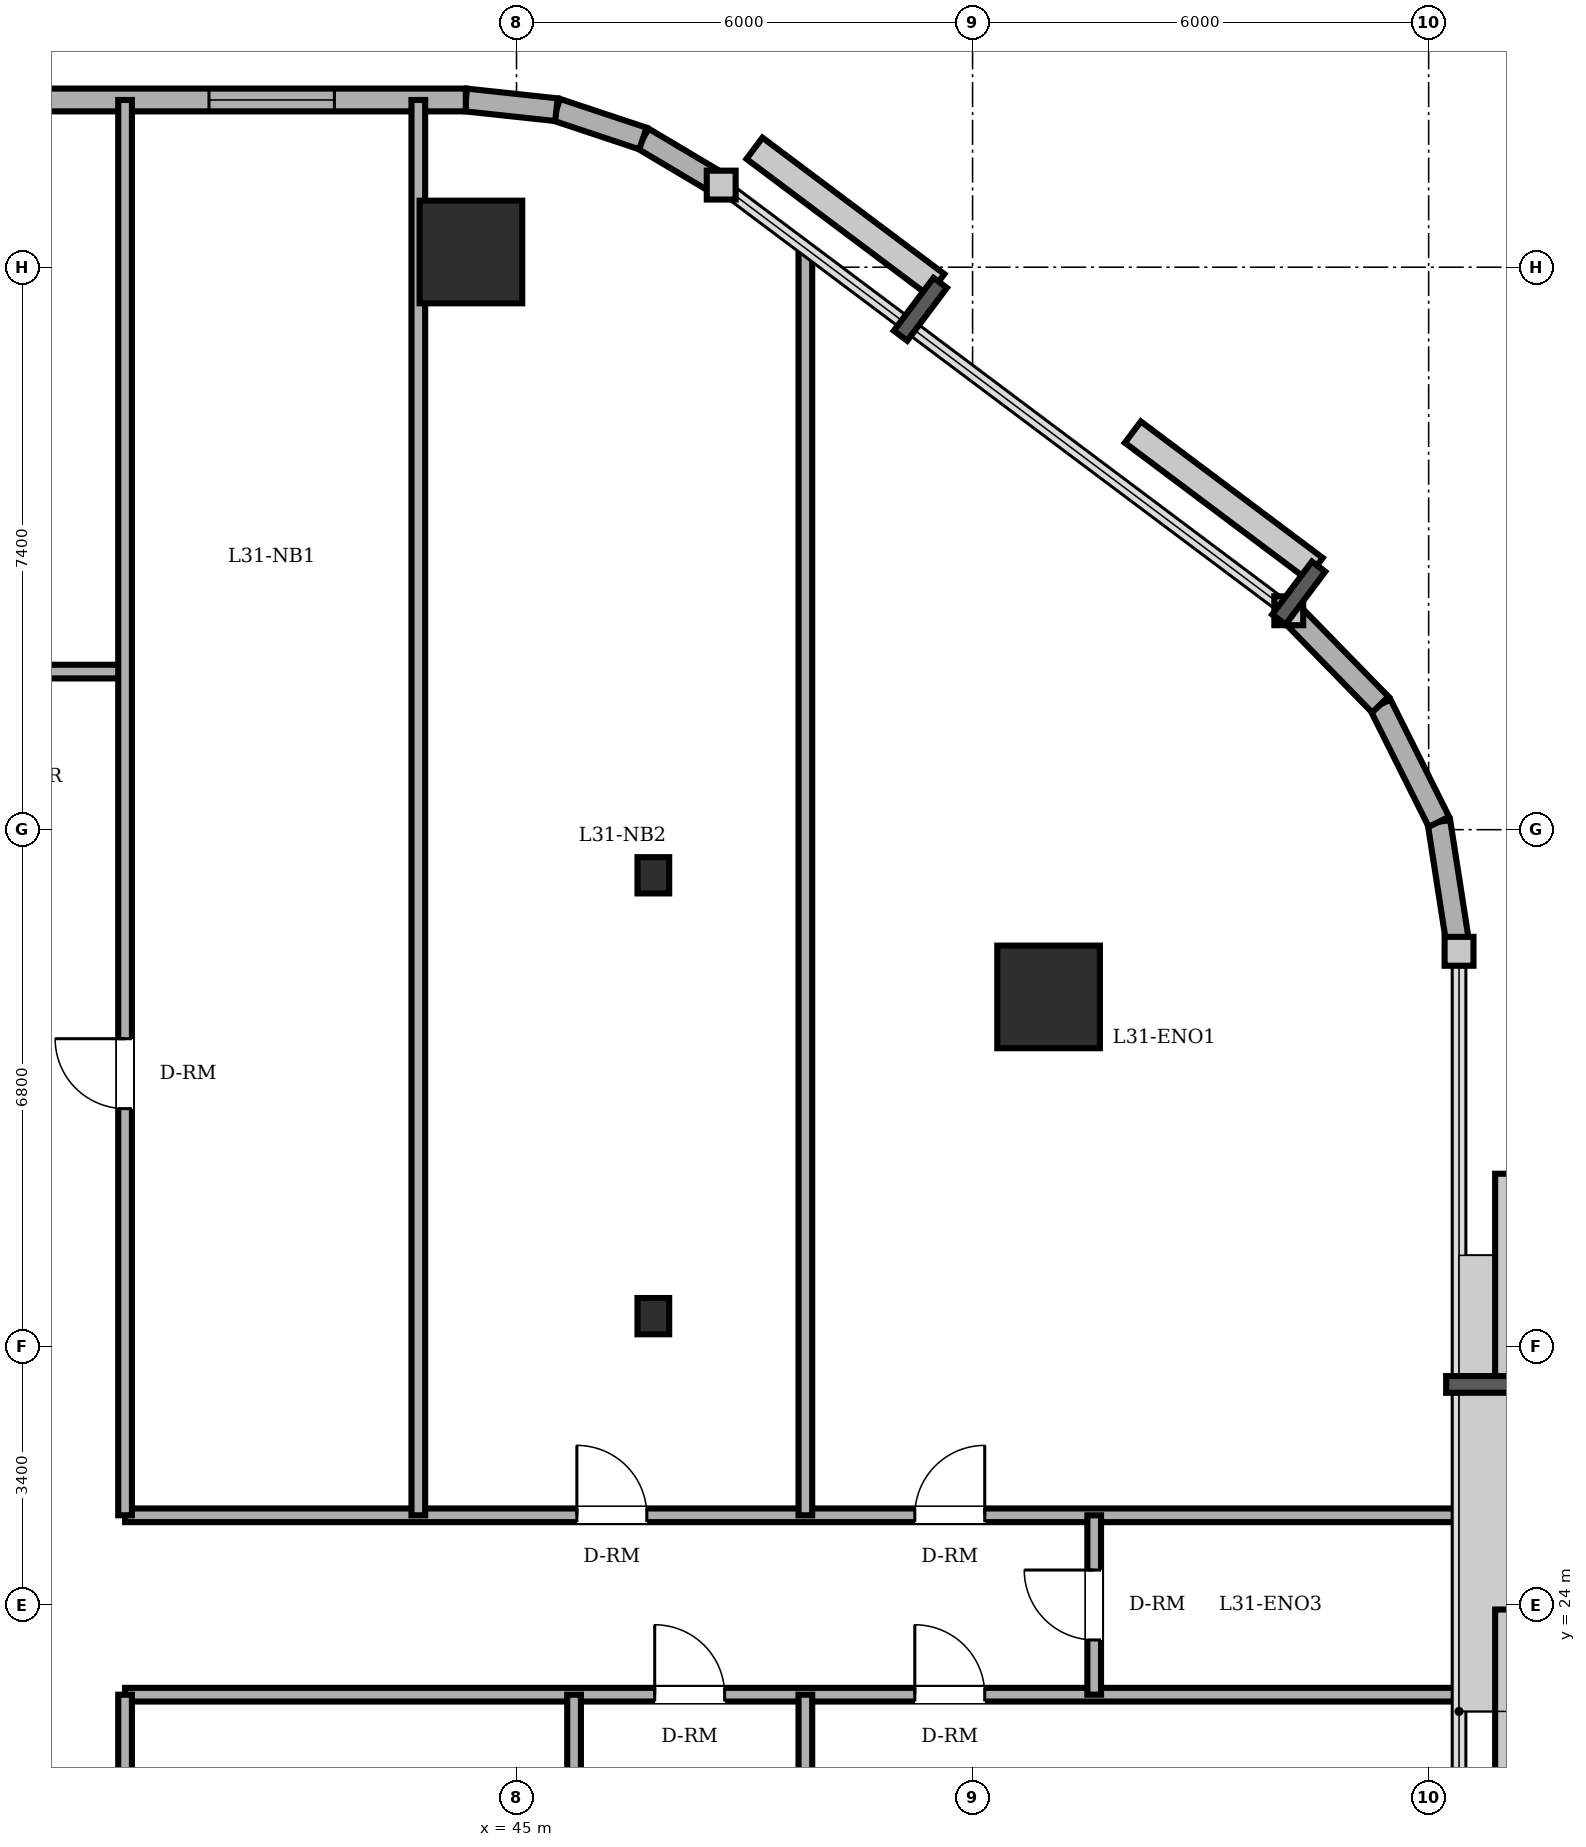
"""IFC4 building model, lengths in metres.
Left out: names, types, materials, properties, quantities, classifications, styles, units other than length and angle.
Written with IfcOpenShell. Run it as: python <this file> out.ifc"""

import sys

from ifc_helpers import new_model, si_unit, direction, frame, frame_2d, origin, origin_2d, place, context, subcontext, project, spatial, rectangle, circle, i_section, extrude, element, fill, save


model = new_model("IFC4")
c1 = context("Model", 3, precision=1e-05, world=origin(), true_north=direction((0.0, 1.0)))
c2 = subcontext(c1, "Body", "Model", "MODEL_VIEW")
j1 = project(units=[si_unit("LENGTHUNIT", "METRE"), si_unit("PLANEANGLEUNIT", "RADIAN")], contexts=[c1])
p1 = place(None, origin())
s1 = spatial("IfcSite", under=j1, at=p1, CompositionType="ELEMENT")
p2 = place(p1, origin())
s2 = spatial("IfcBuilding", under=s1, at=p2, CompositionType="ELEMENT")
p3 = place(p2, frame((0.0, 0.0, 118.7)))
s3 = spatial("IfcBuildingStorey", under=s2, at=p3, CompositionType="ELEMENT", Elevation=118.7)
for number, where, z_axis, x_axis in (
    (1, (52.0, 32.0, 0.0), (0.0, 0.0, 1.0), (1.0, 0.0, 0.0)),
    (2, (44.4, 41.8, 0.0), (0.0, 0.0, 1.0), (1.0, 0.0, 0.0)),
):
    element("IfcColumn", number, at=place(p3, frame(where, z_axis=z_axis, x_axis=x_axis)), inside=s3, PredefinedType="COLUMN", context=c2, shape_type="SweptSolid", body=[
        extrude(circle(Radius=0.675, at=origin_2d()), origin(), (0.0, 0.0, 1.0), 3.6),
    ])
for number, where, z_axis, x_axis in (
    (3, (46.8, 27.8, 0.0), (0.0, 0.0, 1.0), (1.0, 0.0, 0.0)),
    (4, (46.8, 33.6, 0.0), (0.0, 0.0, 1.0), (1.0, 0.0, 0.0)),
):
    element("IfcColumn", number, at=place(p3, frame(where, z_axis=z_axis, x_axis=x_axis)), inside=s3, PredefinedType="COLUMN", context=c2, shape_type="SweptSolid", body=[
        extrude(i_section(OverallWidth=0.417, OverallDepth=0.477, WebThickness=0.036, FlangeThickness=0.057, FilletRadius=0.015, at=origin_2d()), origin(), (0.0, 0.0, 1.0), 3.6),
    ])
p4 = place(p3, frame((57.4, 32.6, 0.0), z_axis=(0.0, 0.0, 1.0), x_axis=(-0.153620989032, 0.988129845581, 0.0)))
e5 = element("IfcWall", 5, at=p4, inside=s3, PredefinedType="SOLIDWALL", context=c2, shape_type="SweptSolid", body=[
    extrude(rectangle(XDim=1.724, YDim=0.3, at=frame_2d((0.862, 0.0))), origin(), (0.0, 0.0, 1.0), 3.4),
])
for number, where, z_axis, x_axis in (
    (6, (57.135, 34.304, 0.0), (0.0, 0.0, 1.0), (-0.447, 0.894, 0.0)),
    (7, (56.364, 35.846, 0.0), (0.0, 0.0, 1.0), (-0.698, 0.716, 0.0)),
):
    element("IfcWall", number, at=place(p3, frame(where, z_axis=z_axis, x_axis=x_axis)), inside=s3, PredefinedType="SOLIDWALL", context=c2, shape_type="SweptSolid", body=[
        extrude(rectangle(XDim=1.724, YDim=0.3, at=frame_2d((0.862, 0.0))), origin(), (0.0, 0.0, 1.0), 3.4),
    ])
p5 = place(p3, frame((47.693, 42.68, 0.0), z_axis=(0.0, 0.0, 1.0), x_axis=(-0.859320591642, 0.511437308749, 0.0)))
e8 = element("IfcWall", 8, at=p5, inside=s3, PredefinedType="SOLIDWALL", context=c2, shape_type="SweptSolid", body=[
    extrude(rectangle(XDim=1.199, YDim=0.3, at=frame_2d((0.599, 0.0))), origin(), (0.0, 0.0, 1.0), 3.4),
])
p6 = place(p3, frame((46.663, 43.293, 0.0), z_axis=(0.0, 0.0, 1.0), x_axis=(-0.948744332129, 0.316044604847, 0.0)))
e9 = element("IfcWall", 9, at=p6, inside=s3, PredefinedType="SOLIDWALL", context=c2, shape_type="SweptSolid", body=[
    extrude(rectangle(XDim=1.2, YDim=0.3, at=frame_2d((0.6, 0.0))), origin(), (0.0, 0.0, 1.0), 3.4),
])
p7 = place(p3, frame((45.525, 43.672, 0.0), z_axis=(0.0, 0.0, 1.0), x_axis=(-0.994289103787, 0.106720092254, 0.0)))
e10 = element("IfcWall", 10, at=p7, inside=s3, PredefinedType="SOLIDWALL", context=c2, shape_type="SweptSolid", body=[
    extrude(rectangle(XDim=1.199, YDim=0.3, at=frame_2d((0.599, 0.0))), origin(), (0.0, 0.0, 1.0), 3.4),
])
p8 = place(p3, frame((44.333, 43.8, 0.0), z_axis=(0.0, 0.0, 1.0), x_axis=(-1.0, 0.0, 0.0)))
e11 = element("IfcWall", 11, at=p8, inside=s3, PredefinedType="SOLIDWALL", context=c2, shape_type="SweptSolid", body=[
    extrude(rectangle(XDim=29.933, YDim=0.3, at=frame_2d((14.967, 0.0))), origin(), (0.0, 0.0, 1.0), 3.4),
])
p9 = place(p8, frame((25.258, 0.0, 0.0)))
e12 = element("IfcOpeningElement", 12, at=p9, cuts=e11, PredefinedType="OPENING", context=c2, shape_type="SweptSolid", body=[
    extrude(rectangle(XDim=0.95, YDim=2.2, at=frame_2d((0.475, 1.1))), frame((0.0, 0.16, 0.0), z_axis=(0.0, -1.0, 0.0), x_axis=(1.0, 0.0, 0.0)), (0.0, 0.0, 1.0), 0.32),
])
p10 = place(p8, frame((1.729, 0.0, 0.85)))
e13 = element("IfcOpeningElement", 13, at=p10, cuts=e11, PredefinedType="OPENING", context=c2, shape_type="SweptSolid", body=[
    extrude(rectangle(XDim=1.65, YDim=1.55, at=frame_2d((0.825, 0.775))), frame((0.0, 0.16, 0.0), z_axis=(0.0, -1.0, 0.0), x_axis=(1.0, 0.0, 0.0)), (0.0, 0.0, 1.0), 0.32),
])
p11 = place(p8, frame((6.341, 0.0, 0.85)))
e14 = element("IfcOpeningElement", 14, at=p11, cuts=e11, PredefinedType="OPENING", context=c2, shape_type="SweptSolid", body=[
    extrude(rectangle(XDim=1.65, YDim=1.55, at=frame_2d((0.825, 0.775))), frame((0.0, 0.16, 0.0), z_axis=(0.0, -1.0, 0.0), x_axis=(1.0, 0.0, 0.0)), (0.0, 0.0, 1.0), 0.32),
])
p12 = place(p8, frame((9.025, 0.0, 0.85)))
e15 = element("IfcOpeningElement", 15, at=p12, cuts=e11, PredefinedType="OPENING", context=c2, shape_type="SweptSolid", body=[
    extrude(rectangle(XDim=1.65, YDim=1.55, at=frame_2d((0.825, 0.775))), frame((0.0, 0.16, 0.0), z_axis=(0.0, -1.0, 0.0), x_axis=(1.0, 0.0, 0.0)), (0.0, 0.0, 1.0), 0.32),
])
p13 = place(p8, frame((14.108, 0.0, 0.85)))
e16 = element("IfcOpeningElement", 16, at=p13, cuts=e11, PredefinedType="OPENING", context=c2, shape_type="SweptSolid", body=[
    extrude(rectangle(XDim=1.65, YDim=1.55, at=frame_2d((0.825, 0.775))), frame((0.0, 0.16, 0.0), z_axis=(0.0, -1.0, 0.0), x_axis=(1.0, 0.0, 0.0)), (0.0, 0.0, 1.0), 0.32),
])
p14 = place(p8, frame((16.508, 0.0, 0.85)))
e17 = element("IfcOpeningElement", 17, at=p14, cuts=e11, PredefinedType="OPENING", context=c2, shape_type="SweptSolid", body=[
    extrude(rectangle(XDim=1.65, YDim=1.55, at=frame_2d((0.825, 0.775))), frame((0.0, 0.16, 0.0), z_axis=(0.0, -1.0, 0.0), x_axis=(1.0, 0.0, 0.0)), (0.0, 0.0, 1.0), 0.32),
])
p15 = place(p8, frame((22.191, 0.0, 0.85)))
e18 = element("IfcOpeningElement", 18, at=p15, cuts=e11, PredefinedType="OPENING", context=c2, shape_type="SweptSolid", body=[
    extrude(rectangle(XDim=1.65, YDim=1.55, at=frame_2d((0.825, 0.775))), frame((0.0, 0.16, 0.0), z_axis=(0.0, -1.0, 0.0), x_axis=(1.0, 0.0, 0.0)), (0.0, 0.0, 1.0), 0.32),
])
p16 = place(p3, frame((39.85, 22.82, 0.0), z_axis=(0.0, 0.0, 1.0), x_axis=(1.0, 0.0, 0.0)))
e19 = element("IfcWall", 19, at=p16, inside=s3, PredefinedType="PARTITIONING", context=c2, shape_type="SweptSolid", body=[
    extrude(rectangle(XDim=17.55, YDim=0.18, at=frame_2d((8.775, 0.0))), origin(), (0.0, 0.0, 1.0), 3.4),
])
p17 = place(p16, frame((6.968, 0.0, 0.0)))
e20 = element("IfcOpeningElement", 20, at=p17, cuts=e19, PredefinedType="OPENING", context=c2, shape_type="SweptSolid", body=[
    extrude(rectangle(XDim=0.92, YDim=2.1, at=frame_2d((0.46, 1.05))), frame((0.0, 0.1, 0.0), z_axis=(0.0, -1.0, 0.0), x_axis=(1.0, 0.0, 0.0)), (0.0, 0.0, 1.0), 0.2),
])
p18 = place(p16, frame((10.39, 0.0, 0.0)))
e21 = element("IfcOpeningElement", 21, at=p18, cuts=e19, PredefinedType="OPENING", context=c2, shape_type="SweptSolid", body=[
    extrude(rectangle(XDim=0.92, YDim=2.1, at=frame_2d((0.46, 1.05))), frame((0.0, 0.1, 0.0), z_axis=(0.0, -1.0, 0.0), x_axis=(1.0, 0.0, 0.0)), (0.0, 0.0, 1.0), 0.2),
])
p19 = place(p3, frame((39.85, 25.18, 0.0), z_axis=(0.0, 0.0, 1.0), x_axis=(1.0, 0.0, 0.0)))
e22 = element("IfcWall", 22, at=p19, inside=s3, PredefinedType="PARTITIONING", context=c2, shape_type="SweptSolid", body=[
    extrude(rectangle(XDim=17.55, YDim=0.18, at=frame_2d((8.775, 0.0))), origin(), (0.0, 0.0, 1.0), 3.4),
])
p20 = place(p19, frame((5.944, 0.0, 0.0)))
e23 = element("IfcOpeningElement", 23, at=p20, cuts=e22, PredefinedType="OPENING", context=c2, shape_type="SweptSolid", body=[
    extrude(rectangle(XDim=0.92, YDim=2.1, at=frame_2d((0.46, 1.05))), frame((0.0, 0.1, 0.0), z_axis=(0.0, -1.0, 0.0), x_axis=(1.0, 0.0, 0.0)), (0.0, 0.0, 1.0), 0.2),
])
p21 = place(p19, frame((10.39, 0.0, 0.0)))
e24 = element("IfcOpeningElement", 24, at=p21, cuts=e22, PredefinedType="OPENING", context=c2, shape_type="SweptSolid", body=[
    extrude(rectangle(XDim=0.92, YDim=2.1, at=frame_2d((0.46, 1.05))), frame((0.0, 0.1, 0.0), z_axis=(0.0, -1.0, 0.0), x_axis=(1.0, 0.0, 0.0)), (0.0, 0.0, 1.0), 0.2),
])
p22 = place(p3, frame((8.8, 36.28, 0.0), z_axis=(0.0, 0.0, 1.0), x_axis=(1.0, 0.0, 0.0)))
e25 = element("IfcWall", 25, at=p22, inside=s3, PredefinedType="PARTITIONING", context=c2, shape_type="SweptSolid", body=[
    extrude(rectangle(XDim=31.05, YDim=0.18, at=frame_2d((15.525, 0.0))), origin(), (0.0, 0.0, 1.0), 3.4),
])
p23 = place(p22, frame((17.05, 0.0, 0.0)))
e26 = element("IfcOpeningElement", 26, at=p23, cuts=e25, PredefinedType="OPENING", context=c2, shape_type="SweptSolid", body=[
    extrude(rectangle(XDim=0.9, YDim=2.1, at=frame_2d((0.45, 1.05))), frame((0.0, 0.1, 0.0), z_axis=(0.0, -1.0, 0.0), x_axis=(1.0, 0.0, 0.0)), (0.0, 0.0, 1.0), 0.2),
])
p24 = place(p22, frame((20.67, 0.0, 0.0)))
e27 = element("IfcOpeningElement", 27, at=p24, cuts=e25, PredefinedType="OPENING", context=c2, shape_type="SweptSolid", body=[
    extrude(rectangle(XDim=0.86, YDim=2.1, at=frame_2d((0.43, 1.05))), frame((0.0, 0.1, 0.0), z_axis=(0.0, -1.0, 0.0), x_axis=(1.0, 0.0, 0.0)), (0.0, 0.0, 1.0), 0.2),
])
p25 = place(p22, frame((8.04, 0.0, 0.0)))
e28 = element("IfcOpeningElement", 28, at=p25, cuts=e25, PredefinedType="OPENING", context=c2, shape_type="SweptSolid", body=[
    extrude(rectangle(XDim=0.92, YDim=2.1, at=frame_2d((0.46, 1.05))), frame((0.0, 0.1, 0.0), z_axis=(0.0, -1.0, 0.0), x_axis=(1.0, 0.0, 0.0)), (0.0, 0.0, 1.0), 0.2),
])
p26 = place(p22, frame((26.305, 0.0, 0.0)))
e29 = element("IfcOpeningElement", 29, at=p26, cuts=e25, PredefinedType="OPENING", context=c2, shape_type="SweptSolid", body=[
    extrude(rectangle(XDim=0.92, YDim=2.1, at=frame_2d((0.46, 1.05))), frame((0.0, 0.1, 0.0), z_axis=(0.0, -1.0, 0.0), x_axis=(1.0, 0.0, 0.0)), (0.0, 0.0, 1.0), 0.2),
])
p27 = place(p3, frame((39.85, 4.2, 0.0), z_axis=(0.0, 0.0, 1.0), x_axis=(0.0, 1.0, 0.0)))
e30 = element("IfcWall", 30, at=p27, inside=s3, PredefinedType="PARTITIONING", context=c2, shape_type="SweptSolid", body=[
    extrude(rectangle(XDim=18.62, YDim=0.18, at=frame_2d((9.31, 0.0))), origin(), (0.0, 0.0, 1.0), 3.4),
])
p28 = place(p27, frame((12.35, 0.0, 0.0)))
e31 = element("IfcOpeningElement", 31, at=p28, cuts=e30, PredefinedType="OPENING", context=c2, shape_type="SweptSolid", body=[
    extrude(rectangle(XDim=0.92, YDim=2.1, at=frame_2d((0.46, 1.05))), frame((0.0, 0.1, 0.0), z_axis=(0.0, -1.0, 0.0), x_axis=(1.0, 0.0, 0.0)), (0.0, 0.0, 1.0), 0.2),
])
p29 = place(p3, frame((39.85, 25.18, 0.0), z_axis=(0.0, 0.0, 1.0), x_axis=(0.0, 1.0, 0.0)))
e32 = element("IfcWall", 32, at=p29, inside=s3, PredefinedType="PARTITIONING", context=c2, shape_type="SweptSolid", body=[
    extrude(rectangle(XDim=18.62, YDim=0.18, at=frame_2d((9.31, 0.0))), origin(), (0.0, 0.0, 1.0), 3.4),
])
p30 = place(p29, frame((5.35, 0.0, 0.0)))
e33 = element("IfcOpeningElement", 33, at=p30, cuts=e32, PredefinedType="OPENING", context=c2, shape_type="SweptSolid", body=[
    extrude(rectangle(XDim=0.92, YDim=2.1, at=frame_2d((0.46, 1.05))), frame((0.0, 0.1, 0.0), z_axis=(0.0, -1.0, 0.0), x_axis=(1.0, 0.0, 0.0)), (0.0, 0.0, 1.0), 0.2),
])
p31 = place(p3, frame((43.708, 25.18, 0.0), z_axis=(0.0, 0.0, 1.0), x_axis=(0.0, 1.0, 0.0)))
e34 = element("IfcWall", 34, at=p31, inside=s3, PredefinedType="PARTITIONING", context=c2, shape_type="SweptSolid", body=[
    extrude(rectangle(XDim=18.62, YDim=0.18, at=frame_2d((9.31, 0.0))), origin(), (0.0, 0.0, 1.0), 3.4),
])
p32 = place(p3, frame((45.757, 4.405, 0.0), z_axis=(0.0, 0.0, 1.0), x_axis=(0.0, 1.0, 0.0)))
e35 = element("IfcWall", 35, at=p32, inside=s3, PredefinedType="PARTITIONING", context=c2, shape_type="SweptSolid", body=[
    extrude(rectangle(XDim=18.415, YDim=0.18, at=frame_2d((9.208, 0.0))), origin(), (0.0, 0.0, 1.0), 2.882),
])
for number, where, z_axis, x_axis in (
    (36, (48.8, 6.15, 0.0), (0.0, 0.0, 1.0), (0.0, 1.0, 0.0)),
    (37, (48.8, 25.18, 0.0), (0.0, 0.0, 1.0), (0.0, 1.0, 0.0)),
):
    element("IfcWall", number, at=place(p3, frame(where, z_axis=z_axis, x_axis=x_axis)), inside=s3, PredefinedType="PARTITIONING", context=c2, shape_type="SweptSolid", body=[
        extrude(rectangle(XDim=16.67, YDim=0.18, at=frame_2d((8.335, 0.0))), origin(), (0.0, 0.0, 1.0), 3.4),
    ])
p33 = place(p3, frame((52.6, 22.82, 0.0), z_axis=(0.0, 0.0, 1.0), x_axis=(0.0, 1.0, 0.0)))
e38 = element("IfcWall", 38, at=p33, inside=s3, PredefinedType="PARTITIONING", context=c2, shape_type="SweptSolid", body=[
    extrude(rectangle(XDim=2.36, YDim=0.18, at=frame_2d((1.18, 0.0))), origin(), (0.0, 0.0, 1.0), 3.4),
])
p34 = place(p33, frame((0.72, 0.0, 0.0)))
e39 = element("IfcOpeningElement", 39, at=p34, cuts=e38, PredefinedType="OPENING", context=c2, shape_type="SweptSolid", body=[
    extrude(rectangle(XDim=0.92, YDim=2.1, at=frame_2d((0.46, 1.05))), frame((0.0, 0.1, 0.0), z_axis=(0.0, -1.0, 0.0), x_axis=(1.0, 0.0, 0.0)), (0.0, 0.0, 1.0), 0.2),
])
p35 = place(p10, origin())
e40 = element("IfcWindow", 40, at=p35, inside=s3, PartitioningType="DOUBLE_PANEL_VERTICAL", PredefinedType="WINDOW", context=c2, shape_type="SweptSolid", body=[
    extrude(rectangle(XDim=1.65, YDim=1.55, at=frame_2d((0.825, 0.775))), frame((0.0, 0.03, 0.0), z_axis=(0.0, -1.0, 0.0), x_axis=(1.0, 0.0, 0.0)), (0.0, 0.0, 1.0), 0.06),
])
fill(e13, e40)
p36 = place(p30, origin())
e41 = element("IfcDoor", 41, at=p36, inside=s3, OperationType="SINGLE_SWING_RIGHT", PredefinedType="DOOR", context=c2, shape_type="SweptSolid", body=[
    extrude(rectangle(XDim=0.92, YDim=2.1, at=frame_2d((0.46, 1.05))), frame((0.0, 0.025, 0.0), z_axis=(0.0, -1.0, 0.0), x_axis=(1.0, 0.0, 0.0)), (0.0, 0.0, 1.0), 0.05),
])
fill(e33, e41)
p37 = place(p20, origin())
e42 = element("IfcDoor", 42, at=p37, inside=s3, OperationType="SINGLE_SWING_LEFT", PredefinedType="DOOR", context=c2, shape_type="SweptSolid", body=[
    extrude(rectangle(XDim=0.92, YDim=2.1, at=frame_2d((0.46, 1.05))), frame((0.0, 0.025, 0.0), z_axis=(0.0, -1.0, 0.0), x_axis=(1.0, 0.0, 0.0)), (0.0, 0.0, 1.0), 0.05),
])
fill(e23, e42)
p38 = place(p17, origin())
e43 = element("IfcDoor", 43, at=p38, inside=s3, OperationType="SINGLE_SWING_LEFT", PredefinedType="DOOR", context=c2, shape_type="SweptSolid", body=[
    extrude(rectangle(XDim=0.92, YDim=2.1, at=frame_2d((0.46, 1.05))), frame((0.0, 0.025, 0.0), z_axis=(0.0, -1.0, 0.0), x_axis=(1.0, 0.0, 0.0)), (0.0, 0.0, 1.0), 0.05),
])
fill(e20, e43)
p39 = place(p21, origin())
e44 = element("IfcDoor", 44, at=p39, inside=s3, OperationType="SINGLE_SWING_RIGHT", PredefinedType="DOOR", context=c2, shape_type="SweptSolid", body=[
    extrude(rectangle(XDim=0.92, YDim=2.1, at=frame_2d((0.46, 1.05))), frame((0.0, 0.025, 0.0), z_axis=(0.0, -1.0, 0.0), x_axis=(1.0, 0.0, 0.0)), (0.0, 0.0, 1.0), 0.05),
])
fill(e24, e44)
p40 = place(p18, origin())
e45 = element("IfcDoor", 45, at=p40, inside=s3, OperationType="SINGLE_SWING_LEFT", PredefinedType="DOOR", context=c2, shape_type="SweptSolid", body=[
    extrude(rectangle(XDim=0.92, YDim=2.1, at=frame_2d((0.46, 1.05))), frame((0.0, 0.025, 0.0), z_axis=(0.0, -1.0, 0.0), x_axis=(1.0, 0.0, 0.0)), (0.0, 0.0, 1.0), 0.05),
])
fill(e21, e45)
p41 = place(p34, origin())
e46 = element("IfcDoor", 46, at=p41, inside=s3, OperationType="SINGLE_SWING_RIGHT", PredefinedType="DOOR", context=c2, shape_type="SweptSolid", body=[
    extrude(rectangle(XDim=0.92, YDim=2.1, at=frame_2d((0.46, 1.05))), frame((0.0, 0.025, 0.0), z_axis=(0.0, -1.0, 0.0), x_axis=(1.0, 0.0, 0.0)), (0.0, 0.0, 1.0), 0.05),
])
fill(e39, e46)
save(model, sys.argv[1])
